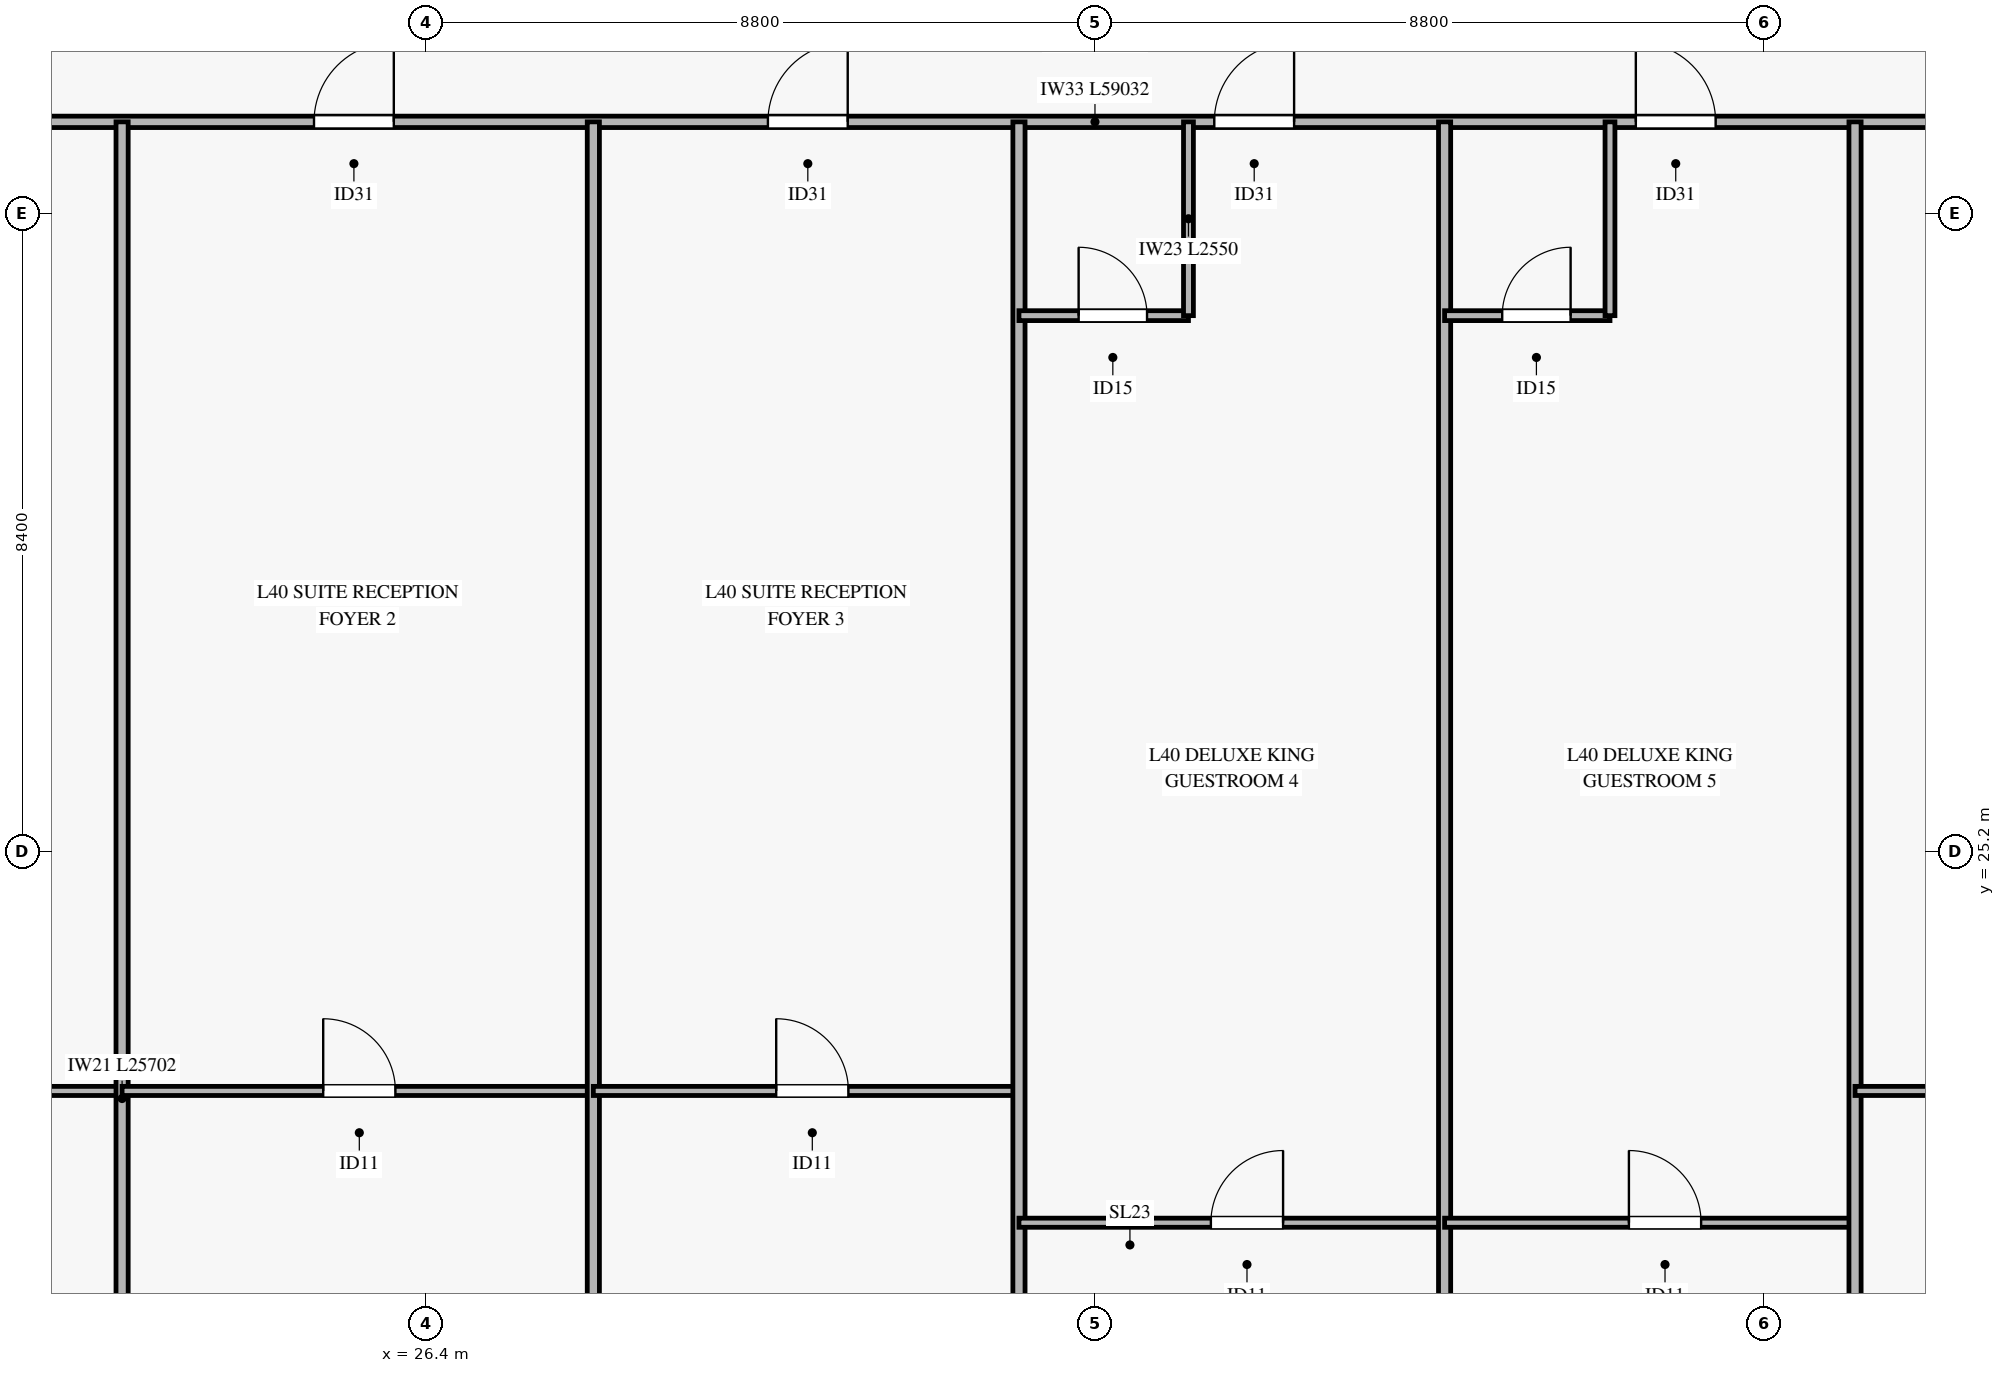
"""IFC4 building model, lengths in metres.
Left out: names, types, materials, properties, quantities, classifications, styles, units other than length and angle.
Written with IfcOpenShell. Run it as: python <this file> out.ifc"""

import sys

from ifc_helpers import new_model, si_unit, direction, frame, frame_2d, origin, place, context, subcontext, project, spatial, rectangle, extrude, source, transform, mapped, element, fill, save


model = new_model("IFC4")
c1 = context("Model", 3, precision=1e-05, world=origin(), true_north=direction((0.0, 1.0)))
c2 = subcontext(c1, "Body", "Model", "MODEL_VIEW")
j1 = project(units=[si_unit("LENGTHUNIT", "METRE"), si_unit("PLANEANGLEUNIT", "RADIAN")], contexts=[c1])
p1 = place(None, origin())
s1 = spatial("IfcSite", under=j1, at=p1, CompositionType="ELEMENT")
p2 = place(p1, origin())
s2 = spatial("IfcBuilding", under=s1, at=p2, CompositionType="ELEMENT")
p3 = place(p2, frame((0.0, 0.0, 163.2)))
s3 = spatial("IfcBuildingStorey", under=s2, at=p3, CompositionType="ELEMENT", Elevation=163.2)
p4 = place(p3, frame((5.684, 34.8, 0.0), z_axis=(0.0, 0.0, 1.0), x_axis=(1.0, 0.0, 0.0)))
e1 = element("IfcWall", 1, at=p4, inside=s3, PredefinedType="PARTITIONING", context=c2, shape_type="SweptSolid", body=[
    extrude(rectangle(XDim=59.032, YDim=0.15, at=frame_2d((29.516, 0.0))), origin(), (0.0, 0.0, 1.0), 2.455),
])
p5 = place(p4, frame((6.645, 0.0, 0.0)))
e2 = element("IfcOpeningElement", 2, at=p5, cuts=e1, PredefinedType="OPENING", context=c2, shape_type="SweptSolid", body=[
    extrude(rectangle(XDim=1.05, YDim=2.15, at=frame_2d((0.525, 1.075))), frame((0.0, 0.085, 0.0), z_axis=(0.0, -1.0, 0.0), x_axis=(1.0, 0.0, 0.0)), (0.0, 0.0, 1.0), 0.17),
])
p6 = place(p4, frame((19.241, 0.0, 0.0)))
e3 = element("IfcOpeningElement", 3, at=p6, cuts=e1, PredefinedType="OPENING", context=c2, shape_type="SweptSolid", body=[
    extrude(rectangle(XDim=1.05, YDim=2.15, at=frame_2d((0.525, 1.075))), frame((0.0, 0.085, 0.0), z_axis=(0.0, -1.0, 0.0), x_axis=(1.0, 0.0, 0.0)), (0.0, 0.0, 1.0), 0.17),
])
p7 = place(p4, frame((25.213, 0.0, 0.0)))
e4 = element("IfcOpeningElement", 4, at=p7, cuts=e1, PredefinedType="OPENING", context=c2, shape_type="SweptSolid", body=[
    extrude(rectangle(XDim=1.05, YDim=2.15, at=frame_2d((0.525, 1.075))), frame((0.0, 0.085, 0.0), z_axis=(0.0, -1.0, 0.0), x_axis=(1.0, 0.0, 0.0)), (0.0, 0.0, 1.0), 0.17),
])
p8 = place(p4, frame((31.086, 0.0, 0.0)))
e5 = element("IfcOpeningElement", 5, at=p8, cuts=e1, PredefinedType="OPENING", context=c2, shape_type="SweptSolid", body=[
    extrude(rectangle(XDim=1.05, YDim=2.15, at=frame_2d((0.525, 1.075))), frame((0.0, 0.085, 0.0), z_axis=(0.0, -1.0, 0.0), x_axis=(1.0, 0.0, 0.0)), (0.0, 0.0, 1.0), 0.17),
])
p9 = place(p4, frame((36.632, 0.0, 0.0)))
e6 = element("IfcOpeningElement", 6, at=p9, cuts=e1, PredefinedType="OPENING", context=c2, shape_type="SweptSolid", body=[
    extrude(rectangle(XDim=1.05, YDim=2.15, at=frame_2d((0.525, 1.075))), frame((0.0, 0.085, 0.0), z_axis=(0.0, -1.0, 0.0), x_axis=(1.0, 0.0, 0.0)), (0.0, 0.0, 1.0), 0.17),
])
p10 = place(p4, frame((47.025, 0.0, 0.0)))
e7 = element("IfcOpeningElement", 7, at=p10, cuts=e1, PredefinedType="OPENING", context=c2, shape_type="SweptSolid", body=[
    extrude(rectangle(XDim=1.05, YDim=2.15, at=frame_2d((0.525, 1.075))), frame((0.0, 0.085, 0.0), z_axis=(0.0, -1.0, 0.0), x_axis=(1.0, 0.0, 0.0)), (0.0, 0.0, 1.0), 0.17),
])
p11 = place(p3, frame((5.684, 22.049, 0.0), z_axis=(0.0, 0.0, 1.0), x_axis=(1.0, 0.0, 0.0)))
e8 = element("IfcWall", 8, at=p11, inside=s3, PredefinedType="PARTITIONING", context=c2, shape_type="SweptSolid", body=[
    extrude(rectangle(XDim=16.716, YDim=0.12, at=frame_2d((8.358, 0.0))), origin(), (0.0, 0.0, 1.0), 2.455),
])
p12 = place(p11, frame((6.972, 0.0, 0.0)))
e9 = element("IfcOpeningElement", 9, at=p12, cuts=e8, PredefinedType="OPENING", context=c2, shape_type="SweptSolid", body=[
    extrude(rectangle(XDim=0.95, YDim=2.1, at=frame_2d((0.475, 1.05))), frame((0.0, 0.07, 0.0), z_axis=(0.0, -1.0, 0.0), x_axis=(1.0, 0.0, 0.0)), (0.0, 0.0, 1.0), 0.14),
])
p13 = place(p3, frame((22.4, 9.098, 0.0), z_axis=(0.0, 0.0, 1.0), x_axis=(0.0, 1.0, 0.0)))
e10 = element("IfcWall", 10, at=p13, inside=s3, PredefinedType="PARTITIONING", context=c2, shape_type="SweptSolid", body=[
    extrude(rectangle(XDim=25.702, YDim=0.16, at=frame_2d((12.851, 0.0))), origin(), (0.0, 0.0, 1.0), 2.755),
])
p14 = place(p3, frame((22.4, 22.049, 0.0), z_axis=(0.0, 0.0, 1.0), x_axis=(1.0, 0.0, 0.0)))
e11 = element("IfcWall", 11, at=p14, inside=s3, PredefinedType="PARTITIONING", context=c2, shape_type="SweptSolid", body=[
    extrude(rectangle(XDim=6.2, YDim=0.12, at=frame_2d((3.1, 0.0))), origin(), (0.0, 0.0, 1.0), 3.27),
])
p15 = place(p14, frame((2.646, 0.0, 0.0)))
e12 = element("IfcOpeningElement", 12, at=p15, cuts=e11, PredefinedType="OPENING", context=c2, shape_type="SweptSolid", body=[
    extrude(rectangle(XDim=0.95, YDim=2.1, at=frame_2d((0.475, 1.05))), frame((0.0, 0.07, 0.0), z_axis=(0.0, -1.0, 0.0), x_axis=(1.0, 0.0, 0.0)), (0.0, 0.0, 1.0), 0.14),
])
p16 = place(p3, frame((28.6, 9.098, 0.0), z_axis=(0.0, 0.0, 1.0), x_axis=(0.0, 1.0, 0.0)))
e13 = element("IfcWall", 13, at=p16, inside=s3, PredefinedType="PARTITIONING", context=c2, shape_type="SweptSolid", body=[
    extrude(rectangle(XDim=25.702, YDim=0.16, at=frame_2d((12.851, 0.0))), origin(), (0.0, 0.0, 1.0), 2.755),
])
p17 = place(p3, frame((28.6, 22.049, 0.0), z_axis=(0.0, 0.0, 1.0), x_axis=(1.0, 0.0, 0.0)))
e14 = element("IfcWall", 14, at=p17, inside=s3, PredefinedType="PARTITIONING", context=c2, shape_type="SweptSolid", body=[
    extrude(rectangle(XDim=5.6, YDim=0.12, at=frame_2d((2.8, 0.0))), origin(), (0.0, 0.0, 1.0), 2.455),
])
p18 = place(p17, frame((2.406, 0.0, 0.0)))
e15 = element("IfcOpeningElement", 15, at=p18, cuts=e14, PredefinedType="OPENING", context=c2, shape_type="SweptSolid", body=[
    extrude(rectangle(XDim=0.95, YDim=2.1, at=frame_2d((0.475, 1.05))), frame((0.0, 0.07, 0.0), z_axis=(0.0, -1.0, 0.0), x_axis=(1.0, 0.0, 0.0)), (0.0, 0.0, 1.0), 0.14),
])
p19 = place(p3, frame((34.2, 9.098, 0.0), z_axis=(0.0, 0.0, 1.0), x_axis=(0.0, 1.0, 0.0)))
e16 = element("IfcWall", 16, at=p19, inside=s3, PredefinedType="PARTITIONING", context=c2, shape_type="SweptSolid", body=[
    extrude(rectangle(XDim=25.702, YDim=0.16, at=frame_2d((12.851, 0.0))), origin(), (0.0, 0.0, 1.0), 2.755),
])
p20 = place(p3, frame((34.2, 32.25, 0.0), z_axis=(0.0, 0.0, 1.0), x_axis=(1.0, 0.0, 0.0)))
e17 = element("IfcWall", 17, at=p20, inside=s3, PredefinedType="PARTITIONING", context=c2, shape_type="SweptSolid", body=[
    extrude(rectangle(XDim=2.23, YDim=0.13, at=frame_2d((1.115, 0.0))), origin(), (0.0, 0.0, 1.0), 3.27),
])
p21 = place(p20, frame((0.785, 0.0, 0.0)))
e18 = element("IfcOpeningElement", 18, at=p21, cuts=e17, PredefinedType="OPENING", context=c2, shape_type="SweptSolid", body=[
    extrude(rectangle(XDim=0.9, YDim=2.1, at=frame_2d((0.45, 1.05))), frame((0.0, 0.075, 0.0), z_axis=(0.0, -1.0, 0.0), x_axis=(1.0, 0.0, 0.0)), (0.0, 0.0, 1.0), 0.15),
])
p22 = place(p3, frame((36.43, 32.25, 0.0), z_axis=(0.0, 0.0, 1.0), x_axis=(0.0, 1.0, 0.0)))
e19 = element("IfcWall", 19, at=p22, inside=s3, PredefinedType="PARTITIONING", context=c2, shape_type="SweptSolid", body=[
    extrude(rectangle(XDim=2.55, YDim=0.13, at=frame_2d((1.275, 0.0))), origin(), (0.0, 0.0, 1.0), 2.805),
])
p23 = place(p3, frame((34.2, 20.315, 0.0), z_axis=(0.0, 0.0, 1.0), x_axis=(1.0, 0.0, 0.0)))
e20 = element("IfcWall", 20, at=p23, inside=s3, PredefinedType="PARTITIONING", context=c2, shape_type="SweptSolid", body=[
    extrude(rectangle(XDim=5.6, YDim=0.12, at=frame_2d((2.8, 0.0))), origin(), (0.0, 0.0, 1.0), 2.455),
])
p24 = place(p23, frame((2.525, 0.0, 0.0)))
e21 = element("IfcOpeningElement", 21, at=p24, cuts=e20, PredefinedType="OPENING", context=c2, shape_type="SweptSolid", body=[
    extrude(rectangle(XDim=0.95, YDim=2.1, at=frame_2d((0.475, 1.05))), frame((0.0, 0.07, 0.0), z_axis=(0.0, -1.0, 0.0), x_axis=(1.0, 0.0, 0.0)), (0.0, 0.0, 1.0), 0.14),
])
p25 = place(p3, frame((39.8, 9.098, 0.0), z_axis=(0.0, 0.0, 1.0), x_axis=(0.0, 1.0, 0.0)))
e22 = element("IfcWall", 22, at=p25, inside=s3, PredefinedType="PARTITIONING", context=c2, shape_type="SweptSolid", body=[
    extrude(rectangle(XDim=25.702, YDim=0.16, at=frame_2d((12.851, 0.0))), origin(), (0.0, 0.0, 1.0), 2.755),
])
p26 = place(p3, frame((39.8, 32.25, 0.0), z_axis=(0.0, 0.0, 1.0), x_axis=(1.0, 0.0, 0.0)))
e23 = element("IfcWall", 23, at=p26, inside=s3, PredefinedType="PARTITIONING", context=c2, shape_type="SweptSolid", body=[
    extrude(rectangle(XDim=2.176, YDim=0.13, at=frame_2d((1.088, 0.0))), origin(), (0.0, 0.0, 1.0), 3.27),
])
p27 = place(p26, frame((0.758, 0.0, 0.0)))
e24 = element("IfcOpeningElement", 24, at=p27, cuts=e23, PredefinedType="OPENING", context=c2, shape_type="SweptSolid", body=[
    extrude(rectangle(XDim=0.9, YDim=2.1, at=frame_2d((0.45, 1.05))), frame((0.0, 0.075, 0.0), z_axis=(0.0, -1.0, 0.0), x_axis=(1.0, 0.0, 0.0)), (0.0, 0.0, 1.0), 0.15),
])
p28 = place(p3, frame((41.976, 32.25, 0.0), z_axis=(0.0, 0.0, 1.0), x_axis=(0.0, 1.0, 0.0)))
e25 = element("IfcWall", 25, at=p28, inside=s3, PredefinedType="PARTITIONING", context=c2, shape_type="SweptSolid", body=[
    extrude(rectangle(XDim=2.55, YDim=0.13, at=frame_2d((1.275, 0.0))), origin(), (0.0, 0.0, 1.0), 2.805),
])
p29 = place(p3, frame((39.8, 20.315, 0.0), z_axis=(0.0, 0.0, 1.0), x_axis=(1.0, 0.0, 0.0)))
e26 = element("IfcWall", 26, at=p29, inside=s3, PredefinedType="PARTITIONING", context=c2, shape_type="SweptSolid", body=[
    extrude(rectangle(XDim=5.4, YDim=0.12, at=frame_2d((2.7, 0.0))), origin(), (0.0, 0.0, 1.0), 2.455),
])
p30 = place(p29, frame((2.425, 0.0, 0.0)))
e27 = element("IfcOpeningElement", 27, at=p30, cuts=e26, PredefinedType="OPENING", context=c2, shape_type="SweptSolid", body=[
    extrude(rectangle(XDim=0.95, YDim=2.1, at=frame_2d((0.475, 1.05))), frame((0.0, 0.07, 0.0), z_axis=(0.0, -1.0, 0.0), x_axis=(1.0, 0.0, 0.0)), (0.0, 0.0, 1.0), 0.14),
])
p31 = place(p3, frame((45.2, 9.098, 0.0), z_axis=(0.0, 0.0, 1.0), x_axis=(0.0, 1.0, 0.0)))
e28 = element("IfcWall", 28, at=p31, inside=s3, PredefinedType="PARTITIONING", context=c2, shape_type="SweptSolid", body=[
    extrude(rectangle(XDim=25.702, YDim=0.16, at=frame_2d((12.851, 0.0))), origin(), (0.0, 0.0, 1.0), 2.755),
])
p32 = place(p3, frame((45.2, 22.049, 0.0), z_axis=(0.0, 0.0, 1.0), x_axis=(1.0, 0.0, 0.0)))
e29 = element("IfcWall", 29, at=p32, inside=s3, PredefinedType="PARTITIONING", context=c2, shape_type="SweptSolid", body=[
    extrude(rectangle(XDim=19.516, YDim=0.12, at=frame_2d((9.758, 0.0))), origin(), (0.0, 0.0, 1.0), 2.455),
])
p33 = place(p32, frame((7.892, 0.0, 0.0)))
e30 = element("IfcOpeningElement", 30, at=p33, cuts=e29, PredefinedType="OPENING", context=c2, shape_type="SweptSolid", body=[
    extrude(rectangle(XDim=0.95, YDim=2.1, at=frame_2d((0.475, 1.05))), frame((0.0, 0.07, 0.0), z_axis=(0.0, -1.0, 0.0), x_axis=(1.0, 0.0, 0.0)), (0.0, 0.0, 1.0), 0.14),
])
m1 = source(origin(), c2, "Body", "SweptSolid", [
    extrude(rectangle(XDim=1.05, YDim=2.15, at=frame_2d((0.525, 1.075))), frame((0.0, 0.025, 0.0), z_axis=(0.0, -1.0, 0.0), x_axis=(1.0, 0.0, 0.0)), (0.0, 0.0, 1.0), 0.05),
])
p34 = place(p6, origin())
e31 = element("IfcDoor", 31, at=p34, inside=s3, OperationType="SINGLE_SWING_RIGHT", PredefinedType="DOOR", context=c2, shape_type="MappedRepresentation", body=[
    mapped(m1, transform((0.0, 0.0, 0.0), x_axis=(1.0, 0.0, 0.0), y_axis=(0.0, 1.0, 0.0), z_axis=(0.0, 0.0, 1.0), scale=1.0)),
])
fill(e3, e31)
m2 = source(origin(), c2, "Body", "SweptSolid", [
    extrude(rectangle(XDim=0.95, YDim=2.1, at=frame_2d((0.475, 1.05))), frame((0.0, 0.025, 0.0), z_axis=(0.0, -1.0, 0.0), x_axis=(1.0, 0.0, 0.0)), (0.0, 0.0, 1.0), 0.05),
])
p35 = place(p15, origin())
e32 = element("IfcDoor", 32, at=p35, inside=s3, OperationType="SINGLE_SWING_LEFT", PredefinedType="DOOR", context=c2, shape_type="MappedRepresentation", body=[
    mapped(m2, transform((0.0, 0.0, 0.0), x_axis=(1.0, 0.0, 0.0), y_axis=(0.0, 1.0, 0.0), z_axis=(0.0, 0.0, 1.0), scale=1.0)),
])
fill(e12, e32)
p36 = place(p7, origin())
e33 = element("IfcDoor", 33, at=p36, inside=s3, OperationType="SINGLE_SWING_RIGHT", PredefinedType="DOOR", context=c2, shape_type="MappedRepresentation", body=[
    mapped(m1, transform((0.0, 0.0, 0.0), x_axis=(1.0, 0.0, 0.0), y_axis=(0.0, 1.0, 0.0), z_axis=(0.0, 0.0, 1.0), scale=1.0)),
])
fill(e4, e33)
p37 = place(p18, origin())
e34 = element("IfcDoor", 34, at=p37, inside=s3, OperationType="SINGLE_SWING_LEFT", PredefinedType="DOOR", context=c2, shape_type="MappedRepresentation", body=[
    mapped(m2, transform((0.0, 0.0, 0.0), x_axis=(1.0, 0.0, 0.0), y_axis=(0.0, 1.0, 0.0), z_axis=(0.0, 0.0, 1.0), scale=1.0)),
])
fill(e15, e34)
p38 = place(p8, origin())
e35 = element("IfcDoor", 35, at=p38, inside=s3, OperationType="SINGLE_SWING_RIGHT", PredefinedType="DOOR", context=c2, shape_type="MappedRepresentation", body=[
    mapped(m1, transform((0.0, 0.0, 0.0), x_axis=(1.0, 0.0, 0.0), y_axis=(0.0, 1.0, 0.0), z_axis=(0.0, 0.0, 1.0), scale=1.0)),
])
fill(e5, e35)
m3 = source(origin(), c2, "Body", "SweptSolid", [
    extrude(rectangle(XDim=0.9, YDim=2.1, at=frame_2d((0.45, 1.05))), frame((0.0, 0.025, 0.0), z_axis=(0.0, -1.0, 0.0), x_axis=(1.0, 0.0, 0.0)), (0.0, 0.0, 1.0), 0.05),
])
p39 = place(p21, origin())
e36 = element("IfcDoor", 36, at=p39, inside=s3, OperationType="SINGLE_SWING_LEFT", PredefinedType="DOOR", context=c2, shape_type="MappedRepresentation", body=[
    mapped(m3, transform((0.0, 0.0, 0.0), x_axis=(1.0, 0.0, 0.0), y_axis=(0.0, 1.0, 0.0), z_axis=(0.0, 0.0, 1.0), scale=1.0)),
])
fill(e18, e36)
p40 = place(p24, origin())
e37 = element("IfcDoor", 37, at=p40, inside=s3, OperationType="SINGLE_SWING_RIGHT", PredefinedType="DOOR", context=c2, shape_type="MappedRepresentation", body=[
    mapped(m2, transform((0.0, 0.0, 0.0), x_axis=(1.0, 0.0, 0.0), y_axis=(0.0, 1.0, 0.0), z_axis=(0.0, 0.0, 1.0), scale=1.0)),
])
fill(e21, e37)
p41 = place(p9, origin())
e38 = element("IfcDoor", 38, at=p41, inside=s3, OperationType="SINGLE_SWING_LEFT", PredefinedType="DOOR", context=c2, shape_type="MappedRepresentation", body=[
    mapped(m1, transform((0.0, 0.0, 0.0), x_axis=(1.0, 0.0, 0.0), y_axis=(0.0, 1.0, 0.0), z_axis=(0.0, 0.0, 1.0), scale=1.0)),
])
fill(e6, e38)
p42 = place(p27, origin())
e39 = element("IfcDoor", 39, at=p42, inside=s3, OperationType="SINGLE_SWING_RIGHT", PredefinedType="DOOR", context=c2, shape_type="MappedRepresentation", body=[
    mapped(m3, transform((0.0, 0.0, 0.0), x_axis=(1.0, 0.0, 0.0), y_axis=(0.0, 1.0, 0.0), z_axis=(0.0, 0.0, 1.0), scale=1.0)),
])
fill(e24, e39)
p43 = place(p30, origin())
e40 = element("IfcDoor", 40, at=p43, inside=s3, OperationType="SINGLE_SWING_LEFT", PredefinedType="DOOR", context=c2, shape_type="MappedRepresentation", body=[
    mapped(m2, transform((0.0, 0.0, 0.0), x_axis=(1.0, 0.0, 0.0), y_axis=(0.0, 1.0, 0.0), z_axis=(0.0, 0.0, 1.0), scale=1.0)),
])
fill(e27, e40)
save(model, sys.argv[1])
